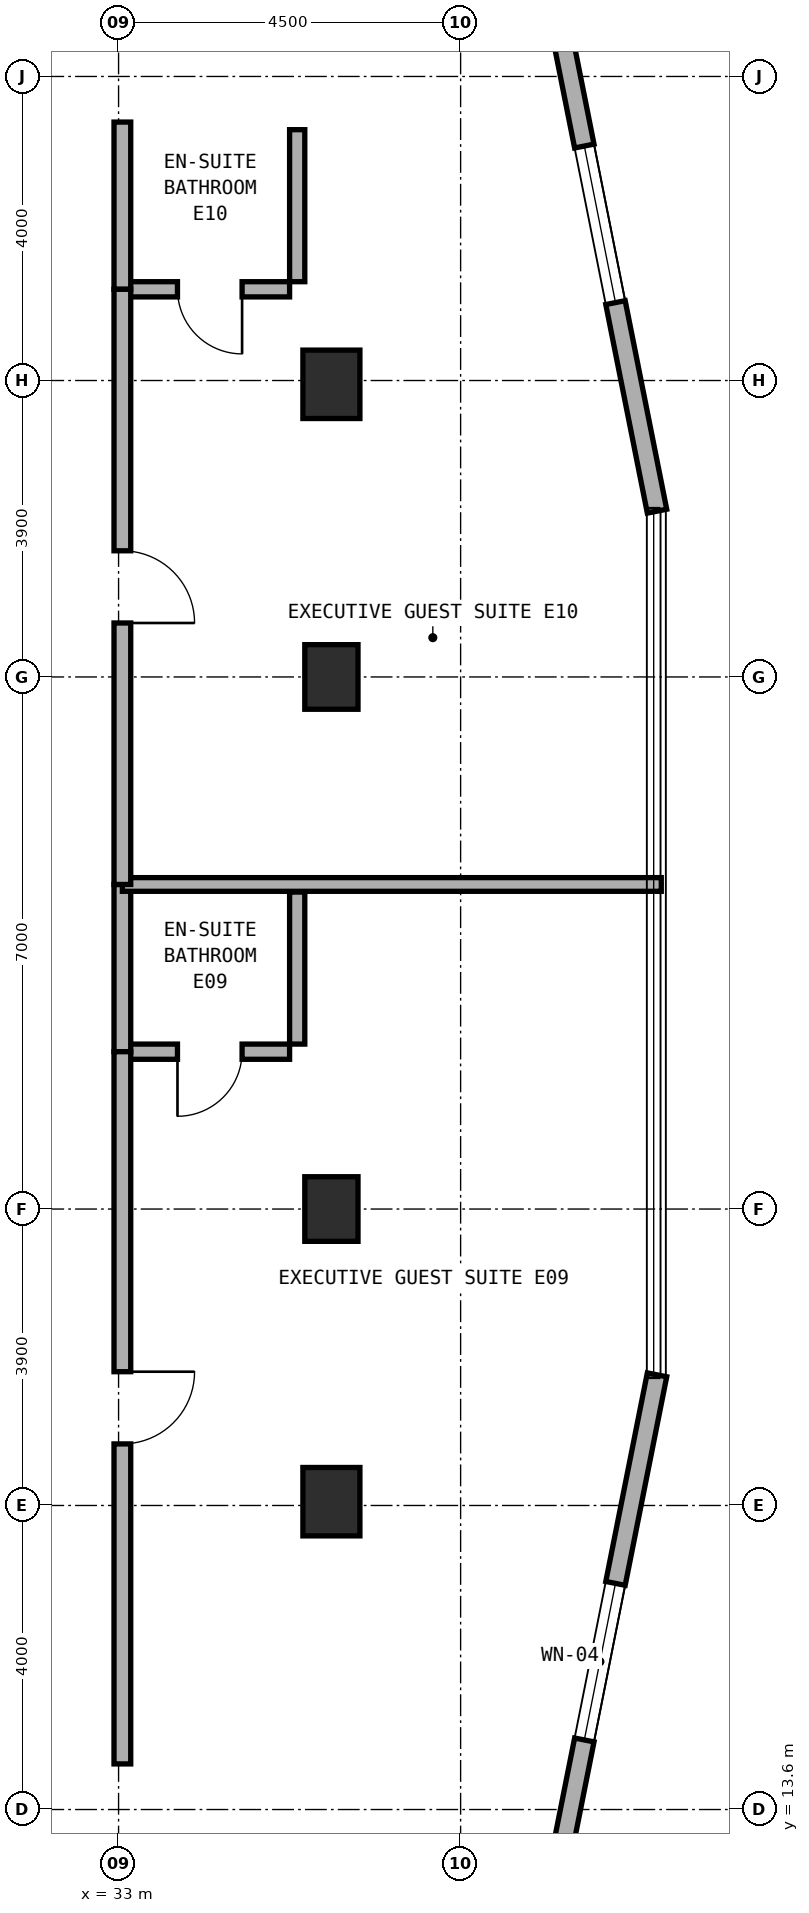
"""IFC4 building model, lengths in metres.
Left out: names, types, materials, properties, quantities, classifications, styles, units other than length and angle.
Written with IfcOpenShell. Run it as: python <this file> out.ifc"""

import sys

from ifc_helpers import new_model, si_unit, direction, frame, frame_2d, origin, origin_2d, place, context, subcontext, project, spatial, rectangle, extrude, element, fill, save


model = new_model("IFC4")
c1 = context("Model", 3, precision=1e-05, world=origin(), true_north=direction((0.0, 1.0)))
c2 = subcontext(c1, "Body", "Model", "MODEL_VIEW")
j1 = project(units=[si_unit("LENGTHUNIT", "METRE"), si_unit("PLANEANGLEUNIT", "RADIAN")], contexts=[c1])
p1 = place(None, origin())
s1 = spatial("IfcSite", under=j1, at=p1, CompositionType="ELEMENT")
p2 = place(p1, origin())
s2 = spatial("IfcBuilding", under=s1, at=p2, CompositionType="ELEMENT")
p3 = place(p2, frame((0.0, 0.0, 217.1)))
s3 = spatial("IfcBuildingStorey", under=s2, at=p3, CompositionType="ELEMENT", Elevation=217.1)
for number, where, z_axis, x_axis in (
    (1, (35.8, 21.5, 0.0), (0.0, 0.0, 1.0), (1.0, 0.0, 0.0)),
    (2, (35.8, 28.5, 0.0), (0.0, 0.0, 1.0), (1.0, 0.0, 0.0)),
):
    element("IfcColumn", number, at=place(p3, frame(where, z_axis=z_axis, x_axis=x_axis)), inside=s3, PredefinedType="COLUMN", context=c2, shape_type="SweptSolid", body=[
        extrude(rectangle(XDim=0.7, YDim=0.85, at=origin_2d()), origin(), (0.0, 0.0, 1.0), 3.6),
    ])
for number, where, z_axis, x_axis in (
    (3, (35.8, 17.65, 0.0), (0.0, 0.0, 1.0), (1.0, 0.0, 0.0)),
    (4, (35.8, 32.35, 0.0), (0.0, 0.0, 1.0), (1.0, 0.0, 0.0)),
):
    element("IfcColumn", number, at=place(p3, frame(where, z_axis=z_axis, x_axis=x_axis)), inside=s3, PredefinedType="COLUMN", context=c2, shape_type="SweptSolid", body=[
        extrude(rectangle(XDim=0.75, YDim=0.9, at=origin_2d()), origin(), (0.0, 0.0, 1.0), 3.6),
    ])
p4 = place(p3, frame((38.371, 10.717, 0.0), z_axis=(0.0, 0.0, 1.0), x_axis=(0.195291715883, 0.980745199176, 0.0)))
e5 = element("IfcWall", 5, at=p4, inside=s3, PredefinedType="STANDARD", context=c2, shape_type="SweptSolid", body=[
    extrude(rectangle(XDim=8.771, YDim=0.26, at=frame_2d((4.385, 0.0))), origin(), (0.0, 0.0, 1.0), 3.32),
])
p5 = place(p4, frame((3.873, 0.0, 0.85)))
e6 = element("IfcOpeningElement", 6, at=p5, cuts=e5, PredefinedType="OPENING", context=c2, shape_type="SweptSolid", body=[
    extrude(rectangle(XDim=2.1, YDim=1.5, at=frame_2d((1.05, 0.75))), frame((0.0, 0.14, 0.0), z_axis=(0.0, -1.0, 0.0), x_axis=(1.0, 0.0, 0.0)), (0.0, 0.0, 1.0), 0.28),
])
p6 = place(p3, frame((40.084, 30.681, 0.0), z_axis=(0.0, 0.0, 1.0), x_axis=(-0.195291715883, 0.980745199176, 0.0)))
e7 = element("IfcWall", 7, at=p6, inside=s3, PredefinedType="STANDARD", context=c2, shape_type="SweptSolid", body=[
    extrude(rectangle(XDim=8.771, YDim=0.26, at=frame_2d((4.385, 0.0))), origin(), (0.0, 0.0, 1.0), 3.32),
])
p7 = place(p6, frame((2.798, 0.0, 0.85)))
e8 = element("IfcOpeningElement", 8, at=p7, cuts=e7, PredefinedType="OPENING", context=c2, shape_type="SweptSolid", body=[
    extrude(rectangle(XDim=2.1, YDim=1.5, at=frame_2d((1.05, 0.75))), frame((0.0, 0.14, 0.0), z_axis=(0.0, -1.0, 0.0), x_axis=(1.0, 0.0, 0.0)), (0.0, 0.0, 1.0), 0.28),
])
p8 = place(p3, frame((33.15, 23.57, 0.0), z_axis=(0.0, 0.0, 1.0), x_axis=(1.0, 0.0, 0.0)))
e9 = element("IfcWall", 9, at=p8, inside=s3, PredefinedType="PLUMBINGWALL", context=c2, shape_type="SweptSolid", body=[
    extrude(rectangle(XDim=2.1, YDim=0.2, at=frame_2d((1.05, 0.0))), origin(), (0.0, 0.0, 1.0), 3.32),
])
p9 = place(p8, frame((0.625, 0.0, 0.0)))
e10 = element("IfcOpeningElement", 10, at=p9, cuts=e9, PredefinedType="OPENING", context=c2, shape_type="SweptSolid", body=[
    extrude(rectangle(XDim=0.85, YDim=2.1, at=frame_2d((0.425, 1.05))), frame((0.0, 0.11, 0.0), z_axis=(0.0, -1.0, 0.0), x_axis=(1.0, 0.0, 0.0)), (0.0, 0.0, 1.0), 0.22),
])
p10 = place(p3, frame((35.35, 23.67, 0.0), z_axis=(0.0, 0.0, 1.0), x_axis=(0.0, 1.0, 0.0)))
e11 = element("IfcWall", 11, at=p10, inside=s3, PredefinedType="PLUMBINGWALL", context=c2, shape_type="SweptSolid", body=[
    extrude(rectangle(XDim=2.0, YDim=0.2, at=frame_2d((1.0, 0.0))), origin(), (0.0, 0.0, 1.0), 3.32),
])
p11 = place(p3, frame((33.05, 23.57, 0.0), z_axis=(0.0, 0.0, 1.0), x_axis=(0.0, 1.0, 0.0)))
e12 = element("IfcWall", 12, at=p11, inside=s3, PredefinedType="SOLIDWALL", context=c2, shape_type="SweptSolid", body=[
    extrude(rectangle(XDim=2.2, YDim=0.22, at=frame_2d((1.1, 0.0))), origin(), (0.0, 0.0, 1.0), 3.32),
])
p12 = place(p3, frame((33.05, 14.2, 0.0), z_axis=(0.0, 0.0, 1.0), x_axis=(0.0, 1.0, 0.0)))
e13 = element("IfcWall", 13, at=p12, inside=s3, PredefinedType="SOLIDWALL", context=c2, shape_type="SweptSolid", body=[
    extrude(rectangle(XDim=9.37, YDim=0.22, at=frame_2d((4.685, 0.0))), origin(), (0.0, 0.0, 1.0), 2.695),
])
p13 = place(p12, frame((4.21, 0.0, 0.0)))
e14 = element("IfcOpeningElement", 14, at=p13, cuts=e13, PredefinedType="OPENING", context=c2, shape_type="SweptSolid", body=[
    extrude(rectangle(XDim=0.95, YDim=2.1, at=frame_2d((0.475, 1.05))), frame((0.0, 0.12, 0.0), z_axis=(0.0, -1.0, 0.0), x_axis=(1.0, 0.0, 0.0)), (0.0, 0.0, 1.0), 0.24),
])
p14 = place(p3, frame((33.05, 25.77, 0.0), z_axis=(0.0, 0.0, 1.0), x_axis=(1.0, 0.0, 0.0)))
e15 = element("IfcWall", 15, at=p14, inside=s3, PredefinedType="SOLIDWALL", context=c2, shape_type="SweptSolid", body=[
    extrude(rectangle(XDim=7.09, YDim=0.18, at=frame_2d((3.545, 0.0))), origin(), (0.0, 0.0, 1.0), 3.015),
])
p15 = place(p3, frame((33.15, 33.6, 0.0), z_axis=(0.0, 0.0, 1.0), x_axis=(1.0, 0.0, 0.0)))
e16 = element("IfcWall", 16, at=p15, inside=s3, PredefinedType="PLUMBINGWALL", context=c2, shape_type="SweptSolid", body=[
    extrude(rectangle(XDim=2.1, YDim=0.2, at=frame_2d((1.05, 0.0))), origin(), (0.0, 0.0, 1.0), 3.32),
])
p16 = place(p15, frame((0.625, 0.0, 0.0)))
e17 = element("IfcOpeningElement", 17, at=p16, cuts=e16, PredefinedType="OPENING", context=c2, shape_type="SweptSolid", body=[
    extrude(rectangle(XDim=0.85, YDim=2.1, at=frame_2d((0.425, 1.05))), frame((0.0, 0.11, 0.0), z_axis=(0.0, -1.0, 0.0), x_axis=(1.0, 0.0, 0.0)), (0.0, 0.0, 1.0), 0.22),
])
p17 = place(p3, frame((35.35, 33.7, 0.0), z_axis=(0.0, 0.0, 1.0), x_axis=(0.0, 1.0, 0.0)))
e18 = element("IfcWall", 18, at=p17, inside=s3, PredefinedType="PLUMBINGWALL", context=c2, shape_type="SweptSolid", body=[
    extrude(rectangle(XDim=2.0, YDim=0.2, at=frame_2d((1.0, 0.0))), origin(), (0.0, 0.0, 1.0), 3.015),
])
p18 = place(p3, frame((33.05, 33.6, 0.0), z_axis=(0.0, 0.0, 1.0), x_axis=(0.0, 1.0, 0.0)))
e19 = element("IfcWall", 19, at=p18, inside=s3, PredefinedType="SOLIDWALL", context=c2, shape_type="SweptSolid", body=[
    extrude(rectangle(XDim=2.2, YDim=0.22, at=frame_2d((1.1, 0.0))), origin(), (0.0, 0.0, 1.0), 3.32),
])
p19 = place(p3, frame((33.05, 25.77, 0.0), z_axis=(0.0, 0.0, 1.0), x_axis=(0.0, 1.0, 0.0)))
e20 = element("IfcWall", 20, at=p19, inside=s3, PredefinedType="SOLIDWALL", context=c2, shape_type="SweptSolid", body=[
    extrude(rectangle(XDim=7.83, YDim=0.22, at=frame_2d((3.915, 0.0))), origin(), (0.0, 0.0, 1.0), 2.695),
])
p20 = place(p19, frame((3.44, 0.0, 0.0)))
e21 = element("IfcOpeningElement", 21, at=p20, cuts=e20, PredefinedType="OPENING", context=c2, shape_type="SweptSolid", body=[
    extrude(rectangle(XDim=0.95, YDim=2.1, at=frame_2d((0.475, 1.05))), frame((0.0, 0.12, 0.0), z_axis=(0.0, -1.0, 0.0), x_axis=(1.0, 0.0, 0.0)), (0.0, 0.0, 1.0), 0.24),
])
p21 = place(p5, origin())
e22 = element("IfcWindow", 22, at=p21, inside=s3, PartitioningType="SINGLE_PANEL", PredefinedType="WINDOW", context=c2, shape_type="SweptSolid", body=[
    extrude(rectangle(XDim=2.1, YDim=1.5, at=frame_2d((1.05, 0.75))), frame((0.0, 0.03, 0.0), z_axis=(0.0, -1.0, 0.0), x_axis=(1.0, 0.0, 0.0)), (0.0, 0.0, 1.0), 0.06),
])
fill(e6, e22)
p22 = place(p7, origin())
e23 = element("IfcWindow", 23, at=p22, inside=s3, PartitioningType="SINGLE_PANEL", PredefinedType="WINDOW", context=c2, shape_type="SweptSolid", body=[
    extrude(rectangle(XDim=2.1, YDim=1.5, at=frame_2d((1.05, 0.75))), frame((0.0, 0.03, 0.0), z_axis=(0.0, -1.0, 0.0), x_axis=(1.0, 0.0, 0.0)), (0.0, 0.0, 1.0), 0.06),
])
fill(e8, e23)
p23 = place(p9, frame((0.85, 0.0, 0.0), z_axis=(0.0, 0.0, 1.0), x_axis=(-1.0, 0.0, 0.0)))
e24 = element("IfcDoor", 24, at=p23, inside=s3, OperationType="SINGLE_SWING_RIGHT", PredefinedType="DOOR", context=c2, shape_type="SweptSolid", body=[
    extrude(rectangle(XDim=0.85, YDim=2.1, at=frame_2d((0.425, 1.05))), frame((0.0, 0.025, 0.0), z_axis=(0.0, -1.0, 0.0), x_axis=(1.0, 0.0, 0.0)), (0.0, 0.0, 1.0), 0.05),
])
fill(e10, e24)
p24 = place(p13, frame((0.95, 0.0, 0.0), z_axis=(0.0, 0.0, 1.0), x_axis=(-1.0, 0.0, 0.0)))
e25 = element("IfcDoor", 25, at=p24, inside=s3, OperationType="SINGLE_SWING_LEFT", PredefinedType="DOOR", context=c2, shape_type="SweptSolid", body=[
    extrude(rectangle(XDim=0.95, YDim=2.1, at=frame_2d((0.475, 1.05))), frame((0.0, 0.025, 0.0), z_axis=(0.0, -1.0, 0.0), x_axis=(1.0, 0.0, 0.0)), (0.0, 0.0, 1.0), 0.05),
])
fill(e14, e25)
p25 = place(p16, frame((0.85, 0.0, 0.0), z_axis=(0.0, 0.0, 1.0), x_axis=(-1.0, 0.0, 0.0)))
e26 = element("IfcDoor", 26, at=p25, inside=s3, OperationType="SINGLE_SWING_LEFT", PredefinedType="DOOR", context=c2, shape_type="SweptSolid", body=[
    extrude(rectangle(XDim=0.85, YDim=2.1, at=frame_2d((0.425, 1.05))), frame((0.0, 0.025, 0.0), z_axis=(0.0, -1.0, 0.0), x_axis=(1.0, 0.0, 0.0)), (0.0, 0.0, 1.0), 0.05),
])
fill(e17, e26)
p26 = place(p20, frame((0.95, 0.0, 0.0), z_axis=(0.0, 0.0, 1.0), x_axis=(-1.0, 0.0, 0.0)))
e27 = element("IfcDoor", 27, at=p26, inside=s3, OperationType="SINGLE_SWING_RIGHT", PredefinedType="DOOR", context=c2, shape_type="SweptSolid", body=[
    extrude(rectangle(XDim=0.95, YDim=2.1, at=frame_2d((0.475, 1.05))), frame((0.0, 0.025, 0.0), z_axis=(0.0, -1.0, 0.0), x_axis=(1.0, 0.0, 0.0)), (0.0, 0.0, 1.0), 0.05),
])
fill(e21, e27)
save(model, sys.argv[1])
